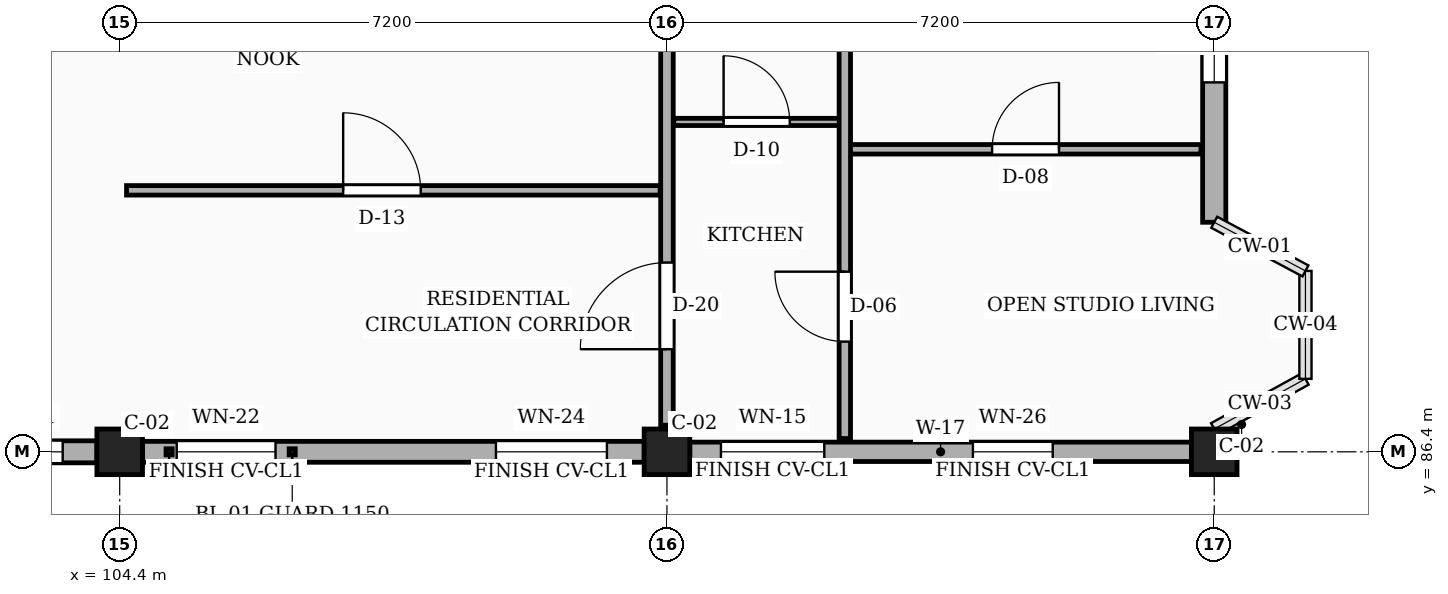
"""IFC4 building model, lengths in metres.
Left out: names, types, materials, properties, quantities, classifications, styles, units other than length and angle.
Written with IfcOpenShell. Run it as: python <this file> out.ifc"""

import sys

from ifc_helpers import new_model, si_unit, direction, frame, frame_2d, origin, origin_2d, place, context, subcontext, project, spatial, rectangle, extrude, element, fill, save


model = new_model("IFC4")
c1 = context("Model", 3, precision=1e-05, world=origin(), true_north=direction((0.0, 1.0)))
c2 = subcontext(c1, "Body", "Model", "MODEL_VIEW")
j1 = project(units=[si_unit("LENGTHUNIT", "METRE"), si_unit("PLANEANGLEUNIT", "RADIAN")], contexts=[c1])
p1 = place(None, origin())
s1 = spatial("IfcSite", under=j1, at=p1, CompositionType="ELEMENT")
p2 = place(p1, origin())
s2 = spatial("IfcBuilding", under=s1, at=p2, CompositionType="ELEMENT")
p3 = place(p2, frame((0.0, 0.0, 7.65)))
s3 = spatial("IfcBuildingStorey", under=s2, at=p3, CompositionType="ELEMENT", Elevation=7.65)
for number, where, z_axis, x_axis in (
    (1, (104.4, 86.4, 0.0), (0.0, 0.0, 1.0), (1.0, 0.0, 0.0)),
    (2, (111.6, 86.4, 0.0), (0.0, 0.0, 1.0), (1.0, 0.0, 0.0)),
    (3, (118.8, 86.4, 0.0), (0.0, 0.0, 1.0), (1.0, 0.0, 0.0)),
):
    element("IfcColumn", number, at=place(p3, frame(where, z_axis=z_axis, x_axis=x_axis)), inside=s3, PredefinedType="COLUMN", context=c2, shape_type="SweptSolid", body=[
        extrude(rectangle(XDim=0.6, YDim=0.6, at=origin_2d()), origin(), (0.0, 0.0, 1.0), 3.15),
    ])
p4 = place(p3, frame((97.5, 86.4, 0.0), z_axis=(0.0, 0.0, 1.0), x_axis=(1.0, 0.0, 0.0)))
e4 = element("IfcWall", 4, at=p4, inside=s3, PredefinedType="SOLIDWALL", context=c2, shape_type="SweptSolid", body=[
    extrude(rectangle(XDim=6.6, YDim=0.29, at=frame_2d((3.3, 0.0))), origin(), (0.0, 0.0, 1.0), 2.46),
])
p5 = place(p4, frame((0.465, 0.0, 0.78)))
e5 = element("IfcOpeningElement", 5, at=p5, cuts=e4, PredefinedType="OPENING", context=c2, shape_type="SweptSolid", body=[
    extrude(rectangle(XDim=1.06, YDim=1.36, at=frame_2d((0.53, 0.68))), frame((0.0, 0.155, 0.0), z_axis=(0.0, -1.0, 0.0), x_axis=(1.0, 0.0, 0.0)), (0.0, 0.0, 1.0), 0.31),
])
p6 = place(p4, frame((2.715, 0.0, 0.78)))
e6 = element("IfcOpeningElement", 6, at=p6, cuts=e4, PredefinedType="OPENING", context=c2, shape_type="SweptSolid", body=[
    extrude(rectangle(XDim=1.22, YDim=1.36, at=frame_2d((0.61, 0.68))), frame((0.0, 0.155, 0.0), z_axis=(0.0, -1.0, 0.0), x_axis=(1.0, 0.0, 0.0)), (0.0, 0.0, 1.0), 0.31),
])
p7 = place(p4, frame((5.11, 0.0, 0.78)))
e7 = element("IfcOpeningElement", 7, at=p7, cuts=e4, PredefinedType="OPENING", context=c2, shape_type="SweptSolid", body=[
    extrude(rectangle(XDim=1.04, YDim=1.26, at=frame_2d((0.52, 0.63))), frame((0.0, 0.155, 0.0), z_axis=(0.0, -1.0, 0.0), x_axis=(1.0, 0.0, 0.0)), (0.0, 0.0, 1.0), 0.31),
])
p8 = place(p3, frame((104.7, 86.4, 0.0), z_axis=(0.0, 0.0, 1.0), x_axis=(1.0, 0.0, 0.0)))
e8 = element("IfcWall", 8, at=p8, inside=s3, PredefinedType="SOLIDWALL", context=c2, shape_type="SweptSolid", body=[
    extrude(rectangle(XDim=6.6, YDim=0.275, at=frame_2d((3.3, 0.0))), origin(), (0.0, 0.0, 1.0), 2.46),
])
p9 = place(p8, frame((0.45, 0.0, 0.78)))
e9 = element("IfcOpeningElement", 9, at=p9, cuts=e8, PredefinedType="OPENING", context=c2, shape_type="SweptSolid", body=[
    extrude(rectangle(XDim=1.3, YDim=1.36, at=frame_2d((0.65, 0.68))), frame((0.0, 0.147, 0.0), z_axis=(0.0, -1.0, 0.0), x_axis=(1.0, 0.0, 0.0)), (0.0, 0.0, 1.0), 0.295),
])
p10 = place(p8, frame((4.65, 0.0, 0.78)))
e10 = element("IfcOpeningElement", 10, at=p10, cuts=e8, PredefinedType="OPENING", context=c2, shape_type="SweptSolid", body=[
    extrude(rectangle(XDim=1.46, YDim=1.36, at=frame_2d((0.73, 0.68))), frame((0.0, 0.147, 0.0), z_axis=(0.0, -1.0, 0.0), x_axis=(1.0, 0.0, 0.0)), (0.0, 0.0, 1.0), 0.295),
])
p11 = place(p3, frame((111.9, 86.4, 0.0), z_axis=(0.0, 0.0, 1.0), x_axis=(1.0, 0.0, 0.0)))
e11 = element("IfcWall", 11, at=p11, inside=s3, PredefinedType="SOLIDWALL", context=c2, shape_type="SweptSolid", body=[
    extrude(rectangle(XDim=6.6, YDim=0.255, at=frame_2d((3.3, 0.0))), origin(), (0.0, 0.0, 1.0), 2.46),
])
p12 = place(p11, frame((0.41, 0.0, 0.78)))
e12 = element("IfcOpeningElement", 12, at=p12, cuts=e11, PredefinedType="OPENING", context=c2, shape_type="SweptSolid", body=[
    extrude(rectangle(XDim=1.36, YDim=1.26, at=frame_2d((0.68, 0.63))), frame((0.0, 0.137, 0.0), z_axis=(0.0, -1.0, 0.0), x_axis=(1.0, 0.0, 0.0)), (0.0, 0.0, 1.0), 0.275),
])
p13 = place(p11, frame((3.725, 0.0, 0.78)))
e13 = element("IfcOpeningElement", 13, at=p13, cuts=e11, PredefinedType="OPENING", context=c2, shape_type="SweptSolid", body=[
    extrude(rectangle(XDim=1.05, YDim=1.44, at=frame_2d((0.525, 0.72))), frame((0.0, 0.137, 0.0), z_axis=(0.0, -1.0, 0.0), x_axis=(1.0, 0.0, 0.0)), (0.0, 0.0, 1.0), 0.275),
])
p14 = place(p3, frame((118.8, 89.42, 0.0), z_axis=(0.0, 0.0, 1.0), x_axis=(0.0, 1.0, 0.0)))
e14 = element("IfcWall", 14, at=p14, inside=s3, PredefinedType="SOLIDWALL", context=c2, shape_type="SweptSolid", body=[
    extrude(rectangle(XDim=3.88, YDim=0.305, at=frame_2d((1.94, 0.0))), origin(), (0.0, 0.0, 1.0), 2.46),
])
p15 = place(p14, frame((1.84, 0.0, 0.78)))
e15 = element("IfcOpeningElement", 15, at=p15, cuts=e14, PredefinedType="OPENING", context=c2, shape_type="SweptSolid", body=[
    extrude(rectangle(XDim=1.05, YDim=1.44, at=frame_2d((0.525, 0.72))), frame((0.0, 0.163, 0.0), z_axis=(0.0, -1.0, 0.0), x_axis=(1.0, 0.0, 0.0)), (0.0, 0.0, 1.0), 0.325),
])
p16 = place(p3, frame((111.6, 86.75, 0.0), z_axis=(0.0, 0.0, 1.0), x_axis=(0.0, 1.0, 0.0)))
e16 = element("IfcWall", 16, at=p16, inside=s3, PredefinedType="PARTITIONING", context=c2, shape_type="SweptSolid", body=[
    extrude(rectangle(XDim=6.5, YDim=0.165, at=frame_2d((3.25, 0.0))), origin(), (0.0, 0.0, 1.0), 2.24),
])
p17 = place(p16, frame((1.0, 0.0, 0.0)))
e17 = element("IfcOpeningElement", 17, at=p17, cuts=e16, PredefinedType="OPENING", context=c2, shape_type="SweptSolid", body=[
    extrude(rectangle(XDim=1.14, YDim=2.18, at=frame_2d((0.57, 1.09))), frame((0.0, 0.093, 0.0), z_axis=(0.0, -1.0, 0.0), x_axis=(1.0, 0.0, 0.0)), (0.0, 0.0, 1.0), 0.185),
])
p18 = place(p3, frame((104.49, 89.84, 0.0), z_axis=(0.0, 0.0, 1.0), x_axis=(1.0, 0.0, 0.0)))
e18 = element("IfcWall", 18, at=p18, inside=s3, PredefinedType="PARTITIONING", context=c2, shape_type="SweptSolid", body=[
    extrude(rectangle(XDim=7.02, YDim=0.125, at=frame_2d((3.51, 0.0))), origin(), (0.0, 0.0, 1.0), 2.325),
])
p19 = place(p18, frame((2.85, 0.0, 0.0)))
e19 = element("IfcOpeningElement", 19, at=p19, cuts=e18, PredefinedType="OPENING", context=c2, shape_type="SweptSolid", body=[
    extrude(rectangle(XDim=1.02, YDim=2.15, at=frame_2d((0.51, 1.075))), frame((0.0, 0.073, 0.0), z_axis=(0.0, -1.0, 0.0), x_axis=(1.0, 0.0, 0.0)), (0.0, 0.0, 1.0), 0.145),
])
p20 = place(p3, frame((114.01, 90.38, 0.0), z_axis=(0.0, 0.0, 1.0), x_axis=(1.0, 0.0, 0.0)))
e20 = element("IfcWall", 20, at=p20, inside=s3, PredefinedType="PARTITIONING", context=c2, shape_type="SweptSolid", body=[
    extrude(rectangle(XDim=4.615, YDim=0.125, at=frame_2d((2.308, 0.0))), origin(), (0.0, 0.0, 1.0), 2.325),
])
p21 = place(p20, frame((1.867, 0.0, 0.0)))
e21 = element("IfcOpeningElement", 21, at=p21, cuts=e20, PredefinedType="OPENING", context=c2, shape_type="SweptSolid", body=[
    extrude(rectangle(XDim=0.88, YDim=2.08, at=frame_2d((0.44, 1.04))), frame((0.0, 0.073, 0.0), z_axis=(0.0, -1.0, 0.0), x_axis=(1.0, 0.0, 0.0)), (0.0, 0.0, 1.0), 0.145),
])
p22 = place(p3, frame((111.69, 90.74, 0.0), z_axis=(0.0, 0.0, 1.0), x_axis=(1.0, 0.0, 0.0)))
e22 = element("IfcWall", 22, at=p22, inside=s3, PredefinedType="PARTITIONING", context=c2, shape_type="SweptSolid", body=[
    extrude(rectangle(XDim=2.18, YDim=0.095, at=frame_2d((1.09, 0.0))), origin(), (0.0, 0.0, 1.0), 2.325),
])
p23 = place(p22, frame((0.655, 0.0, 0.0)))
e23 = element("IfcOpeningElement", 23, at=p23, cuts=e22, PredefinedType="OPENING", context=c2, shape_type="SweptSolid", body=[
    extrude(rectangle(XDim=0.87, YDim=2.05, at=frame_2d((0.435, 1.025))), frame((0.0, 0.058, 0.0), z_axis=(0.0, -1.0, 0.0), x_axis=(1.0, 0.0, 0.0)), (0.0, 0.0, 1.0), 0.115),
])
p24 = place(p3, frame((113.94, 86.575, 0.0), z_axis=(0.0, 0.0, 1.0), x_axis=(0.0, 1.0, 0.0)))
e24 = element("IfcWall", 24, at=p24, inside=s3, PredefinedType="PARTITIONING", context=c2, shape_type="SweptSolid", body=[
    extrude(rectangle(XDim=6.885, YDim=0.15, at=frame_2d((3.442, 0.0))), origin(), (0.0, 0.0, 1.0), 2.325),
])
p25 = place(p24, frame((1.275, 0.0, 0.0)))
e25 = element("IfcOpeningElement", 25, at=p25, cuts=e24, PredefinedType="OPENING", context=c2, shape_type="SweptSolid", body=[
    extrude(rectangle(XDim=0.92, YDim=2.1, at=frame_2d((0.46, 1.05))), frame((0.0, 0.085, 0.0), z_axis=(0.0, -1.0, 0.0), x_axis=(1.0, 0.0, 0.0)), (0.0, 0.0, 1.0), 0.17),
])
p26 = place(p7, origin())
e26 = element("IfcWindow", 26, at=p26, inside=s3, PartitioningType="SINGLE_PANEL", PredefinedType="WINDOW", context=c2, shape_type="SweptSolid", body=[
    extrude(rectangle(XDim=1.04, YDim=1.26, at=frame_2d((0.52, 0.63))), frame((0.0, 0.03, 0.0), z_axis=(0.0, -1.0, 0.0), x_axis=(1.0, 0.0, 0.0)), (0.0, 0.0, 1.0), 0.06),
])
fill(e7, e26)
p27 = place(p9, origin())
e27 = element("IfcWindow", 27, at=p27, inside=s3, PartitioningType="SINGLE_PANEL", PredefinedType="WINDOW", context=c2, shape_type="SweptSolid", body=[
    extrude(rectangle(XDim=1.3, YDim=1.36, at=frame_2d((0.65, 0.68))), frame((0.0, 0.03, 0.0), z_axis=(0.0, -1.0, 0.0), x_axis=(1.0, 0.0, 0.0)), (0.0, 0.0, 1.0), 0.06),
])
fill(e9, e27)
p28 = place(p10, origin())
e28 = element("IfcWindow", 28, at=p28, inside=s3, PartitioningType="SINGLE_PANEL", PredefinedType="WINDOW", context=c2, shape_type="SweptSolid", body=[
    extrude(rectangle(XDim=1.46, YDim=1.36, at=frame_2d((0.73, 0.68))), frame((0.0, 0.03, 0.0), z_axis=(0.0, -1.0, 0.0), x_axis=(1.0, 0.0, 0.0)), (0.0, 0.0, 1.0), 0.06),
])
fill(e10, e28)
p29 = place(p12, origin())
e29 = element("IfcWindow", 29, at=p29, inside=s3, PartitioningType="SINGLE_PANEL", PredefinedType="WINDOW", context=c2, shape_type="SweptSolid", body=[
    extrude(rectangle(XDim=1.36, YDim=1.26, at=frame_2d((0.68, 0.63))), frame((0.0, 0.03, 0.0), z_axis=(0.0, -1.0, 0.0), x_axis=(1.0, 0.0, 0.0)), (0.0, 0.0, 1.0), 0.06),
])
fill(e12, e29)
p30 = place(p13, origin())
e30 = element("IfcWindow", 30, at=p30, inside=s3, PartitioningType="SINGLE_PANEL", PredefinedType="WINDOW", context=c2, shape_type="SweptSolid", body=[
    extrude(rectangle(XDim=1.05, YDim=1.44, at=frame_2d((0.525, 0.72))), frame((0.0, 0.03, 0.0), z_axis=(0.0, -1.0, 0.0), x_axis=(1.0, 0.0, 0.0)), (0.0, 0.0, 1.0), 0.06),
])
fill(e13, e30)
p31 = place(p15, origin())
e31 = element("IfcWindow", 31, at=p31, inside=s3, PartitioningType="SINGLE_PANEL", PredefinedType="WINDOW", context=c2, shape_type="SweptSolid", body=[
    extrude(rectangle(XDim=1.05, YDim=1.44, at=frame_2d((0.525, 0.72))), frame((0.0, 0.03, 0.0), z_axis=(0.0, -1.0, 0.0), x_axis=(1.0, 0.0, 0.0)), (0.0, 0.0, 1.0), 0.06),
])
fill(e15, e31)
p32 = place(p17, origin())
e32 = element("IfcDoor", 32, at=p32, inside=s3, OperationType="SINGLE_SWING_LEFT", PredefinedType="DOOR", context=c2, shape_type="SweptSolid", body=[
    extrude(rectangle(XDim=1.14, YDim=2.18, at=frame_2d((0.57, 1.09))), frame((0.0, 0.025, 0.0), z_axis=(0.0, -1.0, 0.0), x_axis=(1.0, 0.0, 0.0)), (0.0, 0.0, 1.0), 0.05),
])
fill(e17, e32)
p33 = place(p19, origin())
e33 = element("IfcDoor", 33, at=p33, inside=s3, OperationType="SINGLE_SWING_LEFT", PredefinedType="DOOR", context=c2, shape_type="SweptSolid", body=[
    extrude(rectangle(XDim=1.02, YDim=2.15, at=frame_2d((0.51, 1.075))), frame((0.0, 0.025, 0.0), z_axis=(0.0, -1.0, 0.0), x_axis=(1.0, 0.0, 0.0)), (0.0, 0.0, 1.0), 0.05),
])
fill(e19, e33)
p34 = place(p21, origin())
e34 = element("IfcDoor", 34, at=p34, inside=s3, OperationType="SINGLE_SWING_RIGHT", PredefinedType="DOOR", context=c2, shape_type="SweptSolid", body=[
    extrude(rectangle(XDim=0.88, YDim=2.08, at=frame_2d((0.44, 1.04))), frame((0.0, 0.025, 0.0), z_axis=(0.0, -1.0, 0.0), x_axis=(1.0, 0.0, 0.0)), (0.0, 0.0, 1.0), 0.05),
])
fill(e21, e34)
p35 = place(p23, origin())
e35 = element("IfcDoor", 35, at=p35, inside=s3, OperationType="SINGLE_SWING_LEFT", PredefinedType="DOOR", context=c2, shape_type="SweptSolid", body=[
    extrude(rectangle(XDim=0.87, YDim=2.05, at=frame_2d((0.435, 1.025))), frame((0.0, 0.025, 0.0), z_axis=(0.0, -1.0, 0.0), x_axis=(1.0, 0.0, 0.0)), (0.0, 0.0, 1.0), 0.05),
])
fill(e23, e35)
p36 = place(p25, origin())
e36 = element("IfcDoor", 36, at=p36, inside=s3, OperationType="SINGLE_SWING_RIGHT", PredefinedType="DOOR", context=c2, shape_type="SweptSolid", body=[
    extrude(rectangle(XDim=0.92, YDim=2.1, at=frame_2d((0.46, 1.05))), frame((0.0, 0.025, 0.0), z_axis=(0.0, -1.0, 0.0), x_axis=(1.0, 0.0, 0.0)), (0.0, 0.0, 1.0), 0.05),
])
fill(e25, e36)
save(model, sys.argv[1])
